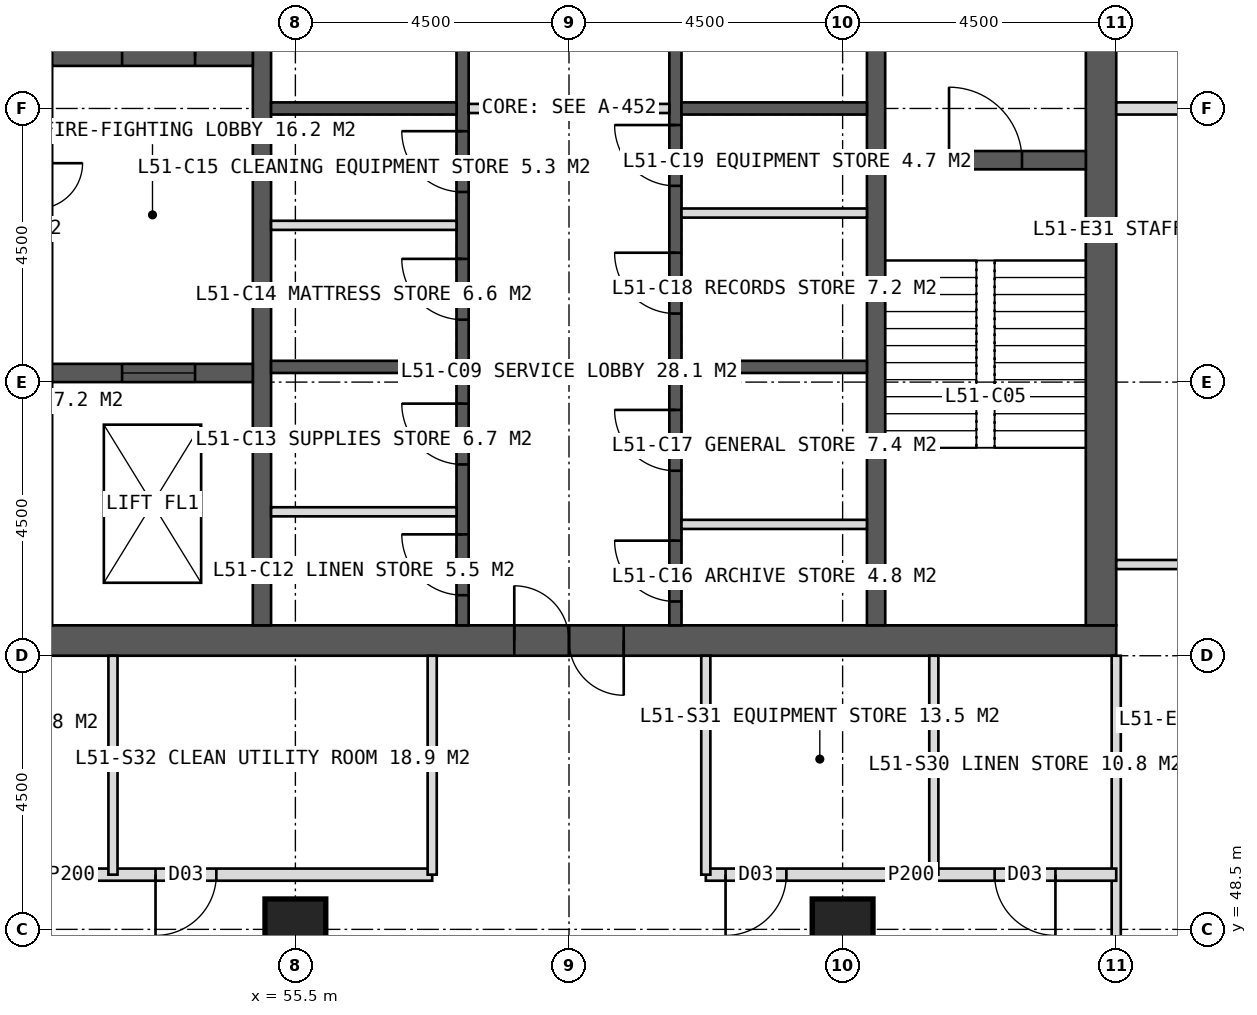
"""IFC4 building model, lengths in metres.
Left out: names, types, materials, properties, quantities, classifications, styles, units other than length and angle.
Written with IfcOpenShell. Run it as: python <this file> out.ifc"""

import sys

from ifc_helpers import new_model, si_unit, direction, frame, frame_2d, origin, origin_2d, place, context, subcontext, project, spatial, rectangle, hollow_rectangle, extrude, element, fill, save


model = new_model("IFC4")
c1 = context("Model", 3, precision=1e-05, world=origin(), true_north=direction((0.0, 1.0)))
c2 = subcontext(c1, "Body", "Model", "MODEL_VIEW")
j1 = project(units=[si_unit("LENGTHUNIT", "METRE"), si_unit("PLANEANGLEUNIT", "RADIAN")], contexts=[c1])
p1 = place(None, origin())
s1 = spatial("IfcSite", under=j1, at=p1, CompositionType="ELEMENT")
p2 = place(p1, origin())
s2 = spatial("IfcBuilding", under=s1, at=p2, CompositionType="ELEMENT")
p3 = place(p2, frame((0.0, 0.0, 213.0)))
s3 = spatial("IfcBuildingStorey", under=s2, at=p3, CompositionType="ELEMENT", Elevation=213.0)
p4 = place(p3, frame((51.0, 53.25, 0.0), z_axis=(0.0, 0.0, 1.0), x_axis=(1.0, 0.0, 0.0)))
e1 = element("IfcWall", 1, at=p4, inside=s3, PredefinedType="SHEAR", context=c2, shape_type="SweptSolid", body=[
    extrude(rectangle(XDim=18.0, YDim=0.5, at=frame_2d((9.0, 0.0))), origin(), (0.0, 0.0, 1.0), 4.0),
])
p5 = place(p4, frame((8.1, 0.0, 0.0)))
e2 = element("IfcOpeningElement", 2, at=p5, cuts=e1, PredefinedType="OPENING", context=c2, shape_type="SweptSolid", body=[
    extrude(rectangle(XDim=1.8, YDim=2.2, at=frame_2d((0.9, 1.1))), frame((0.0, 0.26, 0.0), z_axis=(0.0, -1.0, 0.0), x_axis=(1.0, 0.0, 0.0)), (0.0, 0.0, 1.0), 0.52),
])
p6 = place(p3, frame((68.75, 53.5, 0.0), z_axis=(0.0, 0.0, 1.0), x_axis=(0.0, 1.0, 0.0)))
e3 = element("IfcWall", 3, at=p6, inside=s3, PredefinedType="SHEAR", context=c2, shape_type="SweptSolid", body=[
    extrude(rectangle(XDim=17.0, YDim=0.5, at=frame_2d((8.5, 0.0))), origin(), (0.0, 0.0, 1.0), 4.0),
])
p7 = place(p6, frame((9.6, 0.0, 0.0)))
e4 = element("IfcOpeningElement", 4, at=p7, cuts=e3, PredefinedType="OPENING", context=c2, shape_type="SweptSolid", body=[
    extrude(rectangle(XDim=1.5, YDim=2.2, at=frame_2d((0.75, 1.1))), frame((0.0, 0.26, 0.0), z_axis=(0.0, -1.0, 0.0), x_axis=(1.0, 0.0, 0.0)), (0.0, 0.0, 1.0), 0.52),
])
for number, where, z_axis, x_axis in (
    (5, (54.95, 53.5, 0.0), (0.0, 0.0, 1.0), (0.0, 1.0, 0.0)),
    (6, (65.05, 53.5, 0.0), (0.0, 0.0, 1.0), (0.0, 1.0, 0.0)),
):
    element("IfcWall", number, at=place(p3, frame(where, z_axis=z_axis, x_axis=x_axis)), inside=s3, PredefinedType="SHEAR", context=c2, shape_type="SweptSolid", body=[
        extrude(rectangle(XDim=17.0, YDim=0.3, at=frame_2d((8.5, 0.0))), origin(), (0.0, 0.0, 1.0), 4.0),
    ])
p8 = place(p3, frame((58.25, 53.5, 0.0), z_axis=(0.0, 0.0, 1.0), x_axis=(0.0, 1.0, 0.0)))
e7 = element("IfcWall", 7, at=p8, inside=s3, PredefinedType="SHEAR", context=c2, shape_type="SweptSolid", body=[
    extrude(rectangle(XDim=17.0, YDim=0.2, at=frame_2d((8.5, 0.0))), origin(), (0.0, 0.0, 1.0), 4.0),
])
p9 = place(p8, frame((0.496, 0.0, 0.0)))
e8 = element("IfcOpeningElement", 8, at=p9, cuts=e7, PredefinedType="OPENING", context=c2, shape_type="SweptSolid", body=[
    extrude(rectangle(XDim=1.0, YDim=2.1, at=frame_2d((0.5, 1.05))), frame((0.0, 0.11, 0.0), z_axis=(0.0, -1.0, 0.0), x_axis=(1.0, 0.0, 0.0)), (0.0, 0.0, 1.0), 0.22),
])
p10 = place(p8, frame((2.646, 0.0, 0.0)))
e9 = element("IfcOpeningElement", 9, at=p10, cuts=e7, PredefinedType="OPENING", context=c2, shape_type="SweptSolid", body=[
    extrude(rectangle(XDim=1.0, YDim=2.1, at=frame_2d((0.5, 1.05))), frame((0.0, 0.11, 0.0), z_axis=(0.0, -1.0, 0.0), x_axis=(1.0, 0.0, 0.0)), (0.0, 0.0, 1.0), 0.22),
])
p11 = place(p8, frame((5.027, 0.0, 0.0)))
e10 = element("IfcOpeningElement", 10, at=p11, cuts=e7, PredefinedType="OPENING", context=c2, shape_type="SweptSolid", body=[
    extrude(rectangle(XDim=1.0, YDim=2.1, at=frame_2d((0.5, 1.05))), frame((0.0, 0.11, 0.0), z_axis=(0.0, -1.0, 0.0), x_axis=(1.0, 0.0, 0.0)), (0.0, 0.0, 1.0), 0.22),
])
p12 = place(p8, frame((7.126, 0.0, 0.0)))
e11 = element("IfcOpeningElement", 11, at=p12, cuts=e7, PredefinedType="OPENING", context=c2, shape_type="SweptSolid", body=[
    extrude(rectangle(XDim=1.0, YDim=2.1, at=frame_2d((0.5, 1.05))), frame((0.0, 0.11, 0.0), z_axis=(0.0, -1.0, 0.0), x_axis=(1.0, 0.0, 0.0)), (0.0, 0.0, 1.0), 0.22),
])
p13 = place(p8, frame((10.025, 0.0, 0.0)))
e12 = element("IfcOpeningElement", 12, at=p13, cuts=e7, PredefinedType="OPENING", context=c2, shape_type="SweptSolid", body=[
    extrude(rectangle(XDim=1.4, YDim=2.2, at=frame_2d((0.7, 1.1))), frame((0.0, 0.11, 0.0), z_axis=(0.0, -1.0, 0.0), x_axis=(1.0, 0.0, 0.0)), (0.0, 0.0, 1.0), 0.22),
])
p14 = place(p8, frame((14.325, 0.0, 0.0)))
e13 = element("IfcOpeningElement", 13, at=p14, cuts=e7, PredefinedType="OPENING", context=c2, shape_type="SweptSolid", body=[
    extrude(rectangle(XDim=1.4, YDim=2.2, at=frame_2d((0.7, 1.1))), frame((0.0, 0.11, 0.0), z_axis=(0.0, -1.0, 0.0), x_axis=(1.0, 0.0, 0.0)), (0.0, 0.0, 1.0), 0.22),
])
p15 = place(p3, frame((61.75, 53.5, 0.0), z_axis=(0.0, 0.0, 1.0), x_axis=(0.0, 1.0, 0.0)))
e14 = element("IfcWall", 14, at=p15, inside=s3, PredefinedType="SHEAR", context=c2, shape_type="SweptSolid", body=[
    extrude(rectangle(XDim=17.0, YDim=0.2, at=frame_2d((8.5, 0.0))), origin(), (0.0, 0.0, 1.0), 4.0),
])
p16 = place(p15, frame((0.393, 0.0, 0.0)))
e15 = element("IfcOpeningElement", 15, at=p16, cuts=e14, PredefinedType="OPENING", context=c2, shape_type="SweptSolid", body=[
    extrude(rectangle(XDim=1.0, YDim=2.1, at=frame_2d((0.5, 1.05))), frame((0.0, 0.11, 0.0), z_axis=(0.0, -1.0, 0.0), x_axis=(1.0, 0.0, 0.0)), (0.0, 0.0, 1.0), 0.22),
])
p17 = place(p15, frame((2.542, 0.0, 0.0)))
e16 = element("IfcOpeningElement", 16, at=p17, cuts=e14, PredefinedType="OPENING", context=c2, shape_type="SweptSolid", body=[
    extrude(rectangle(XDim=1.0, YDim=2.1, at=frame_2d((0.5, 1.05))), frame((0.0, 0.11, 0.0), z_axis=(0.0, -1.0, 0.0), x_axis=(1.0, 0.0, 0.0)), (0.0, 0.0, 1.0), 0.22),
])
p18 = place(p15, frame((5.127, 0.0, 0.0)))
e17 = element("IfcOpeningElement", 17, at=p18, cuts=e14, PredefinedType="OPENING", context=c2, shape_type="SweptSolid", body=[
    extrude(rectangle(XDim=1.0, YDim=2.1, at=frame_2d((0.5, 1.05))), frame((0.0, 0.11, 0.0), z_axis=(0.0, -1.0, 0.0), x_axis=(1.0, 0.0, 0.0)), (0.0, 0.0, 1.0), 0.22),
])
p19 = place(p15, frame((7.228, 0.0, 0.0)))
e18 = element("IfcOpeningElement", 18, at=p19, cuts=e14, PredefinedType="OPENING", context=c2, shape_type="SweptSolid", body=[
    extrude(rectangle(XDim=1.0, YDim=2.1, at=frame_2d((0.5, 1.05))), frame((0.0, 0.11, 0.0), z_axis=(0.0, -1.0, 0.0), x_axis=(1.0, 0.0, 0.0)), (0.0, 0.0, 1.0), 0.22),
])
p20 = place(p15, frame((10.025, 0.0, 0.0)))
e19 = element("IfcOpeningElement", 19, at=p20, cuts=e14, PredefinedType="OPENING", context=c2, shape_type="SweptSolid", body=[
    extrude(rectangle(XDim=1.4, YDim=2.2, at=frame_2d((0.7, 1.1))), frame((0.0, 0.11, 0.0), z_axis=(0.0, -1.0, 0.0), x_axis=(1.0, 0.0, 0.0)), (0.0, 0.0, 1.0), 0.22),
])
p21 = place(p15, frame((14.325, 0.0, 0.0)))
e20 = element("IfcOpeningElement", 20, at=p21, cuts=e14, PredefinedType="OPENING", context=c2, shape_type="SweptSolid", body=[
    extrude(rectangle(XDim=1.4, YDim=2.2, at=frame_2d((0.7, 1.1))), frame((0.0, 0.11, 0.0), z_axis=(0.0, -1.0, 0.0), x_axis=(1.0, 0.0, 0.0)), (0.0, 0.0, 1.0), 0.22),
])
for number, where, z_axis, x_axis in (
    (21, (55.1, 57.75, 0.0), (0.0, 0.0, 1.0), (1.0, 0.0, 0.0)),
    (22, (61.85, 57.75, 0.0), (0.0, 0.0, 1.0), (1.0, 0.0, 0.0)),
    (23, (55.1, 62.0, 0.0), (0.0, 0.0, 1.0), (1.0, 0.0, 0.0)),
    (24, (61.85, 62.0, 0.0), (0.0, 0.0, 1.0), (1.0, 0.0, 0.0)),
):
    element("IfcWall", number, at=place(p3, frame(where, z_axis=z_axis, x_axis=x_axis)), inside=s3, PredefinedType="SHEAR", context=c2, shape_type="SweptSolid", body=[
        extrude(rectangle(XDim=3.05, YDim=0.2, at=frame_2d((1.525, 0.0))), origin(), (0.0, 0.0, 1.0), 4.0),
    ])
p22 = place(p3, frame((51.5, 62.85, 0.0), z_axis=(0.0, 0.0, 1.0), x_axis=(1.0, 0.0, 0.0)))
e25 = element("IfcWall", 25, at=p22, inside=s3, PredefinedType="SHEAR", context=c2, shape_type="SweptSolid", body=[
    extrude(rectangle(XDim=3.3, YDim=0.3, at=frame_2d((1.65, 0.0))), origin(), (0.0, 0.0, 1.0), 4.0),
])
p23 = place(p22, frame((1.15, 0.0, 0.0)))
e26 = element("IfcOpeningElement", 26, at=p23, cuts=e25, PredefinedType="OPENING", context=c2, shape_type="SweptSolid", body=[
    extrude(rectangle(XDim=1.2, YDim=2.1, at=frame_2d((0.6, 1.05))), frame((0.0, 0.16, 0.0), z_axis=(0.0, -1.0, 0.0), x_axis=(1.0, 0.0, 0.0)), (0.0, 0.0, 1.0), 0.32),
])
p24 = place(p3, frame((51.5, 57.65, 0.0), z_axis=(0.0, 0.0, 1.0), x_axis=(1.0, 0.0, 0.0)))
e27 = element("IfcWall", 27, at=p24, inside=s3, PredefinedType="SHEAR", context=c2, shape_type="SweptSolid", body=[
    extrude(rectangle(XDim=3.3, YDim=0.3, at=frame_2d((1.65, 0.0))), origin(), (0.0, 0.0, 1.0), 4.0),
])
p25 = place(p24, frame((1.15, 0.0, 0.0)))
e28 = element("IfcOpeningElement", 28, at=p25, cuts=e27, PredefinedType="OPENING", context=c2, shape_type="SweptSolid", body=[
    extrude(rectangle(XDim=1.2, YDim=2.2, at=frame_2d((0.6, 1.1))), frame((0.0, 0.16, 0.0), z_axis=(0.0, -1.0, 0.0), x_axis=(1.0, 0.0, 0.0)), (0.0, 0.0, 1.0), 0.32),
])
p26 = place(p3, frame((65.2, 61.15, 0.0), z_axis=(0.0, 0.0, 1.0), x_axis=(1.0, 0.0, 0.0)))
e29 = element("IfcWall", 29, at=p26, inside=s3, PredefinedType="SHEAR", context=c2, shape_type="SweptSolid", body=[
    extrude(rectangle(XDim=3.3, YDim=0.3, at=frame_2d((1.65, 0.0))), origin(), (0.0, 0.0, 1.0), 4.0),
])
p27 = place(p26, frame((1.05, 0.0, 0.0)))
e30 = element("IfcOpeningElement", 30, at=p27, cuts=e29, PredefinedType="OPENING", context=c2, shape_type="SweptSolid", body=[
    extrude(rectangle(XDim=1.2, YDim=2.1, at=frame_2d((0.6, 1.05))), frame((0.0, 0.16, 0.0), z_axis=(0.0, -1.0, 0.0), x_axis=(1.0, 0.0, 0.0)), (0.0, 0.0, 1.0), 0.32),
])
for number, where, z_axis, x_axis in (
    (31, (55.5, 48.5, 0.0), (0.0, 0.0, 1.0), (1.0, 0.0, 0.0)),
    (32, (64.5, 48.5, 0.0), (0.0, 0.0, 1.0), (1.0, 0.0, 0.0)),
):
    element("IfcColumn", number, at=place(p3, frame(where, z_axis=z_axis, x_axis=x_axis)), inside=s3, PredefinedType="COLUMN", context=c2, shape_type="SweptSolid", body=[
        extrude(hollow_rectangle(XDim=1.0, YDim=1.0, WallThickness=0.1, at=origin_2d()), origin(), (0.0, 0.0, 1.0), 4.0),
    ])
p28 = place(p3, frame((69.0, 53.0, 0.0), z_axis=(0.0, 0.0, 1.0), x_axis=(0.0, -1.0, 0.0)))
e33 = element("IfcWall", 33, at=p28, inside=s3, PredefinedType="PARTITIONING", context=c2, shape_type="SweptSolid", body=[
    extrude(rectangle(XDim=5.1, YDim=0.15, at=frame_2d((2.55, 0.0))), origin(), (0.0, 0.0, 1.0), 3.75),
])
p29 = place(p3, frame((69.0, 49.4, 0.0), z_axis=(0.0, 0.0, 1.0), x_axis=(-1.0, 0.0, 0.0)))
e34 = element("IfcWall", 34, at=p29, inside=s3, PredefinedType="PARTITIONING", context=c2, shape_type="SweptSolid", body=[
    extrude(rectangle(XDim=6.75, YDim=0.2, at=frame_2d((3.375, 0.0))), origin(), (0.0, 0.0, 1.0), 3.75),
])
p30 = place(p29, frame((1.0, 0.0, 0.0)))
e35 = element("IfcOpeningElement", 35, at=p30, cuts=e34, PredefinedType="OPENING", context=c2, shape_type="SweptSolid", body=[
    extrude(rectangle(XDim=1.0, YDim=2.1, at=frame_2d((0.5, 1.05))), frame((0.0, 0.11, 0.0), z_axis=(0.0, -1.0, 0.0), x_axis=(1.0, 0.0, 0.0)), (0.0, 0.0, 1.0), 0.22),
])
p31 = place(p29, frame((5.425, 0.0, 0.0)))
e36 = element("IfcOpeningElement", 36, at=p31, cuts=e34, PredefinedType="OPENING", context=c2, shape_type="SweptSolid", body=[
    extrude(rectangle(XDim=1.0, YDim=2.1, at=frame_2d((0.5, 1.05))), frame((0.0, 0.11, 0.0), z_axis=(0.0, -1.0, 0.0), x_axis=(1.0, 0.0, 0.0)), (0.0, 0.0, 1.0), 0.22),
])
p32 = place(p3, frame((57.75, 49.4, 0.0), z_axis=(0.0, 0.0, 1.0), x_axis=(-1.0, 0.0, 0.0)))
e37 = element("IfcWall", 37, at=p32, inside=s3, PredefinedType="PARTITIONING", context=c2, shape_type="SweptSolid", body=[
    extrude(rectangle(XDim=11.85, YDim=0.2, at=frame_2d((5.925, 0.0))), origin(), (0.0, 0.0, 1.0), 3.75),
])
p33 = place(p32, frame((3.55, 0.0, 0.0)))
e38 = element("IfcOpeningElement", 38, at=p33, cuts=e37, PredefinedType="OPENING", context=c2, shape_type="SweptSolid", body=[
    extrude(rectangle(XDim=1.0, YDim=2.1, at=frame_2d((0.5, 1.05))), frame((0.0, 0.11, 0.0), z_axis=(0.0, -1.0, 0.0), x_axis=(1.0, 0.0, 0.0)), (0.0, 0.0, 1.0), 0.22),
])
p34 = place(p32, frame((8.05, 0.0, 0.0)))
e39 = element("IfcOpeningElement", 39, at=p34, cuts=e37, PredefinedType="OPENING", context=c2, shape_type="SweptSolid", body=[
    extrude(rectangle(XDim=1.0, YDim=2.1, at=frame_2d((0.5, 1.05))), frame((0.0, 0.11, 0.0), z_axis=(0.0, -1.0, 0.0), x_axis=(1.0, 0.0, 0.0)), (0.0, 0.0, 1.0), 0.22),
])
for number, where, z_axis, x_axis in (
    (40, (62.25, 53.0, 0.0), (0.0, 0.0, 1.0), (0.0, -1.0, 0.0)),
    (41, (57.75, 53.0, 0.0), (0.0, 0.0, 1.0), (0.0, -1.0, 0.0)),
    (42, (66.0, 53.0, 0.0), (0.0, 0.0, 1.0), (0.0, -1.0, 0.0)),
    (43, (52.5, 53.0, 0.0), (0.0, 0.0, 1.0), (0.0, -1.0, 0.0)),
):
    element("IfcWall", number, at=place(p3, frame(where, z_axis=z_axis, x_axis=x_axis)), inside=s3, PredefinedType="PARTITIONING", context=c2, shape_type="SweptSolid", body=[
        extrude(rectangle(XDim=3.6, YDim=0.15, at=frame_2d((1.8, 0.0))), origin(), (0.0, 0.0, 1.0), 3.75),
    ])
p35 = place(p3, frame((69.0, 62.0, 0.0), z_axis=(0.0, 0.0, 1.0), x_axis=(1.0, 0.0, 0.0)))
e44 = element("IfcWall", 44, at=p35, inside=s3, PredefinedType="SOLIDWALL", context=c2, shape_type="SweptSolid", body=[
    extrude(rectangle(XDim=5.1, YDim=0.2, at=frame_2d((2.55, 0.0))), origin(), (0.0, 0.0, 1.0), 2.95),
])
p36 = place(p3, frame((69.0, 54.5, 0.0), z_axis=(0.0, 0.0, 1.0), x_axis=(1.0, 0.0, 0.0)))
e45 = element("IfcWall", 45, at=p36, inside=s3, PredefinedType="PARTITIONING", context=c2, shape_type="SweptSolid", body=[
    extrude(rectangle(XDim=5.1, YDim=0.15, at=frame_2d((2.55, 0.0))), origin(), (0.0, 0.0, 1.0), 3.75),
])
for number, where, z_axis, x_axis in (
    (46, (55.1, 55.367, 0.0), (0.0, 0.0, 1.0), (1.0, 0.0, 0.0)),
    (47, (61.85, 55.16, 0.0), (0.0, 0.0, 1.0), (1.0, 0.0, 0.0)),
    (48, (55.1, 60.078, 0.0), (0.0, 0.0, 1.0), (1.0, 0.0, 0.0)),
    (49, (61.85, 60.28, 0.0), (0.0, 0.0, 1.0), (1.0, 0.0, 0.0)),
):
    element("IfcWall", number, at=place(p3, frame(where, z_axis=z_axis, x_axis=x_axis)), inside=s3, PredefinedType="PARTITIONING", context=c2, shape_type="SweptSolid", body=[
        extrude(rectangle(XDim=3.05, YDim=0.15, at=frame_2d((1.525, 0.0))), origin(), (0.0, 0.0, 1.0), 3.75),
    ])
p37 = place(p3, frame((58.35, 62.0, 0.0), z_axis=(0.0, 0.0, 1.0), x_axis=(1.0, 0.0, 0.0)))
e50 = element("IfcWall", 50, at=p37, inside=s3, PredefinedType="PARTITIONING", context=c2, shape_type="SweptSolid", body=[
    extrude(rectangle(XDim=3.3, YDim=0.15, at=frame_2d((1.65, 0.0))), origin(), (0.0, 0.0, 1.0), 3.75),
])
p38 = place(p30, origin())
e51 = element("IfcDoor", 51, at=p38, inside=s3, OperationType="SINGLE_SWING_LEFT", PredefinedType="DOOR", context=c2, shape_type="SweptSolid", body=[
    extrude(rectangle(XDim=1.0, YDim=2.1, at=frame_2d((0.5, 1.05))), frame((0.0, 0.025, 0.0), z_axis=(0.0, -1.0, 0.0), x_axis=(1.0, 0.0, 0.0)), (0.0, 0.0, 1.0), 0.05),
])
fill(e35, e51)
p39 = place(p31, origin())
e52 = element("IfcDoor", 52, at=p39, inside=s3, OperationType="SINGLE_SWING_RIGHT", PredefinedType="DOOR", context=c2, shape_type="SweptSolid", body=[
    extrude(rectangle(XDim=1.0, YDim=2.1, at=frame_2d((0.5, 1.05))), frame((0.0, 0.025, 0.0), z_axis=(0.0, -1.0, 0.0), x_axis=(1.0, 0.0, 0.0)), (0.0, 0.0, 1.0), 0.05),
])
fill(e36, e52)
p40 = place(p33, origin())
e53 = element("IfcDoor", 53, at=p40, inside=s3, OperationType="SINGLE_SWING_RIGHT", PredefinedType="DOOR", context=c2, shape_type="SweptSolid", body=[
    extrude(rectangle(XDim=1.0, YDim=2.1, at=frame_2d((0.5, 1.05))), frame((0.0, 0.025, 0.0), z_axis=(0.0, -1.0, 0.0), x_axis=(1.0, 0.0, 0.0)), (0.0, 0.0, 1.0), 0.05),
])
fill(e38, e53)
p41 = place(p23, origin())
e54 = element("IfcDoor", 54, at=p41, inside=s3, OperationType="SINGLE_SWING_RIGHT", PredefinedType="DOOR", context=c2, shape_type="SweptSolid", body=[
    extrude(rectangle(XDim=1.2, YDim=2.1, at=frame_2d((0.6, 1.05))), frame((0.0, 0.025, 0.0), z_axis=(0.0, -1.0, 0.0), x_axis=(1.0, 0.0, 0.0)), (0.0, 0.0, 1.0), 0.05),
])
fill(e26, e54)
p42 = place(p27, origin())
e55 = element("IfcDoor", 55, at=p42, inside=s3, OperationType="SINGLE_SWING_LEFT", PredefinedType="DOOR", context=c2, shape_type="SweptSolid", body=[
    extrude(rectangle(XDim=1.2, YDim=2.1, at=frame_2d((0.6, 1.05))), frame((0.0, 0.025, 0.0), z_axis=(0.0, -1.0, 0.0), x_axis=(1.0, 0.0, 0.0)), (0.0, 0.0, 1.0), 0.05),
])
fill(e30, e55)
p43 = place(p25, origin())
e56 = element("IfcDoor", 56, at=p43, inside=s3, OperationType="SLIDING_TO_LEFT", PredefinedType="DOOR", context=c2, shape_type="SweptSolid", body=[
    extrude(rectangle(XDim=1.2, YDim=2.2, at=frame_2d((0.6, 1.1))), frame((0.0, 0.025, 0.0), z_axis=(0.0, -1.0, 0.0), x_axis=(1.0, 0.0, 0.0)), (0.0, 0.0, 1.0), 0.05),
])
fill(e28, e56)
p44 = place(p9, origin())
e57 = element("IfcDoor", 57, at=p44, inside=s3, OperationType="SINGLE_SWING_RIGHT", PredefinedType="DOOR", context=c2, shape_type="SweptSolid", body=[
    extrude(rectangle(XDim=1.0, YDim=2.1, at=frame_2d((0.5, 1.05))), frame((0.0, 0.025, 0.0), z_axis=(0.0, -1.0, 0.0), x_axis=(1.0, 0.0, 0.0)), (0.0, 0.0, 1.0), 0.05),
])
fill(e8, e57)
p45 = place(p10, origin())
e58 = element("IfcDoor", 58, at=p45, inside=s3, OperationType="SINGLE_SWING_RIGHT", PredefinedType="DOOR", context=c2, shape_type="SweptSolid", body=[
    extrude(rectangle(XDim=1.0, YDim=2.1, at=frame_2d((0.5, 1.05))), frame((0.0, 0.025, 0.0), z_axis=(0.0, -1.0, 0.0), x_axis=(1.0, 0.0, 0.0)), (0.0, 0.0, 1.0), 0.05),
])
fill(e9, e58)
p46 = place(p16, origin())
e59 = element("IfcDoor", 59, at=p46, inside=s3, OperationType="SINGLE_SWING_RIGHT", PredefinedType="DOOR", context=c2, shape_type="SweptSolid", body=[
    extrude(rectangle(XDim=1.0, YDim=2.1, at=frame_2d((0.5, 1.05))), frame((0.0, 0.025, 0.0), z_axis=(0.0, -1.0, 0.0), x_axis=(1.0, 0.0, 0.0)), (0.0, 0.0, 1.0), 0.05),
])
fill(e15, e59)
p47 = place(p17, origin())
e60 = element("IfcDoor", 60, at=p47, inside=s3, OperationType="SINGLE_SWING_RIGHT", PredefinedType="DOOR", context=c2, shape_type="SweptSolid", body=[
    extrude(rectangle(XDim=1.0, YDim=2.1, at=frame_2d((0.5, 1.05))), frame((0.0, 0.025, 0.0), z_axis=(0.0, -1.0, 0.0), x_axis=(1.0, 0.0, 0.0)), (0.0, 0.0, 1.0), 0.05),
])
fill(e16, e60)
p48 = place(p11, origin())
e61 = element("IfcDoor", 61, at=p48, inside=s3, OperationType="SINGLE_SWING_RIGHT", PredefinedType="DOOR", context=c2, shape_type="SweptSolid", body=[
    extrude(rectangle(XDim=1.0, YDim=2.1, at=frame_2d((0.5, 1.05))), frame((0.0, 0.025, 0.0), z_axis=(0.0, -1.0, 0.0), x_axis=(1.0, 0.0, 0.0)), (0.0, 0.0, 1.0), 0.05),
])
fill(e10, e61)
p49 = place(p12, origin())
e62 = element("IfcDoor", 62, at=p49, inside=s3, OperationType="SINGLE_SWING_RIGHT", PredefinedType="DOOR", context=c2, shape_type="SweptSolid", body=[
    extrude(rectangle(XDim=1.0, YDim=2.1, at=frame_2d((0.5, 1.05))), frame((0.0, 0.025, 0.0), z_axis=(0.0, -1.0, 0.0), x_axis=(1.0, 0.0, 0.0)), (0.0, 0.0, 1.0), 0.05),
])
fill(e11, e62)
p50 = place(p18, origin())
e63 = element("IfcDoor", 63, at=p50, inside=s3, OperationType="SINGLE_SWING_RIGHT", PredefinedType="DOOR", context=c2, shape_type="SweptSolid", body=[
    extrude(rectangle(XDim=1.0, YDim=2.1, at=frame_2d((0.5, 1.05))), frame((0.0, 0.025, 0.0), z_axis=(0.0, -1.0, 0.0), x_axis=(1.0, 0.0, 0.0)), (0.0, 0.0, 1.0), 0.05),
])
fill(e17, e63)
p51 = place(p19, origin())
e64 = element("IfcDoor", 64, at=p51, inside=s3, OperationType="SINGLE_SWING_RIGHT", PredefinedType="DOOR", context=c2, shape_type="SweptSolid", body=[
    extrude(rectangle(XDim=1.0, YDim=2.1, at=frame_2d((0.5, 1.05))), frame((0.0, 0.025, 0.0), z_axis=(0.0, -1.0, 0.0), x_axis=(1.0, 0.0, 0.0)), (0.0, 0.0, 1.0), 0.05),
])
fill(e18, e64)
p52 = place(p5, origin())
e65 = element("IfcDoor", 65, at=p52, inside=s3, OperationType="DOUBLE_DOOR_SINGLE_SWING", PredefinedType="DOOR", context=c2, shape_type="SweptSolid", body=[
    extrude(rectangle(XDim=1.8, YDim=2.2, at=frame_2d((0.9, 1.1))), frame((0.0, 0.025, 0.0), z_axis=(0.0, -1.0, 0.0), x_axis=(1.0, 0.0, 0.0)), (0.0, 0.0, 1.0), 0.05),
])
fill(e2, e65)
save(model, sys.argv[1])
